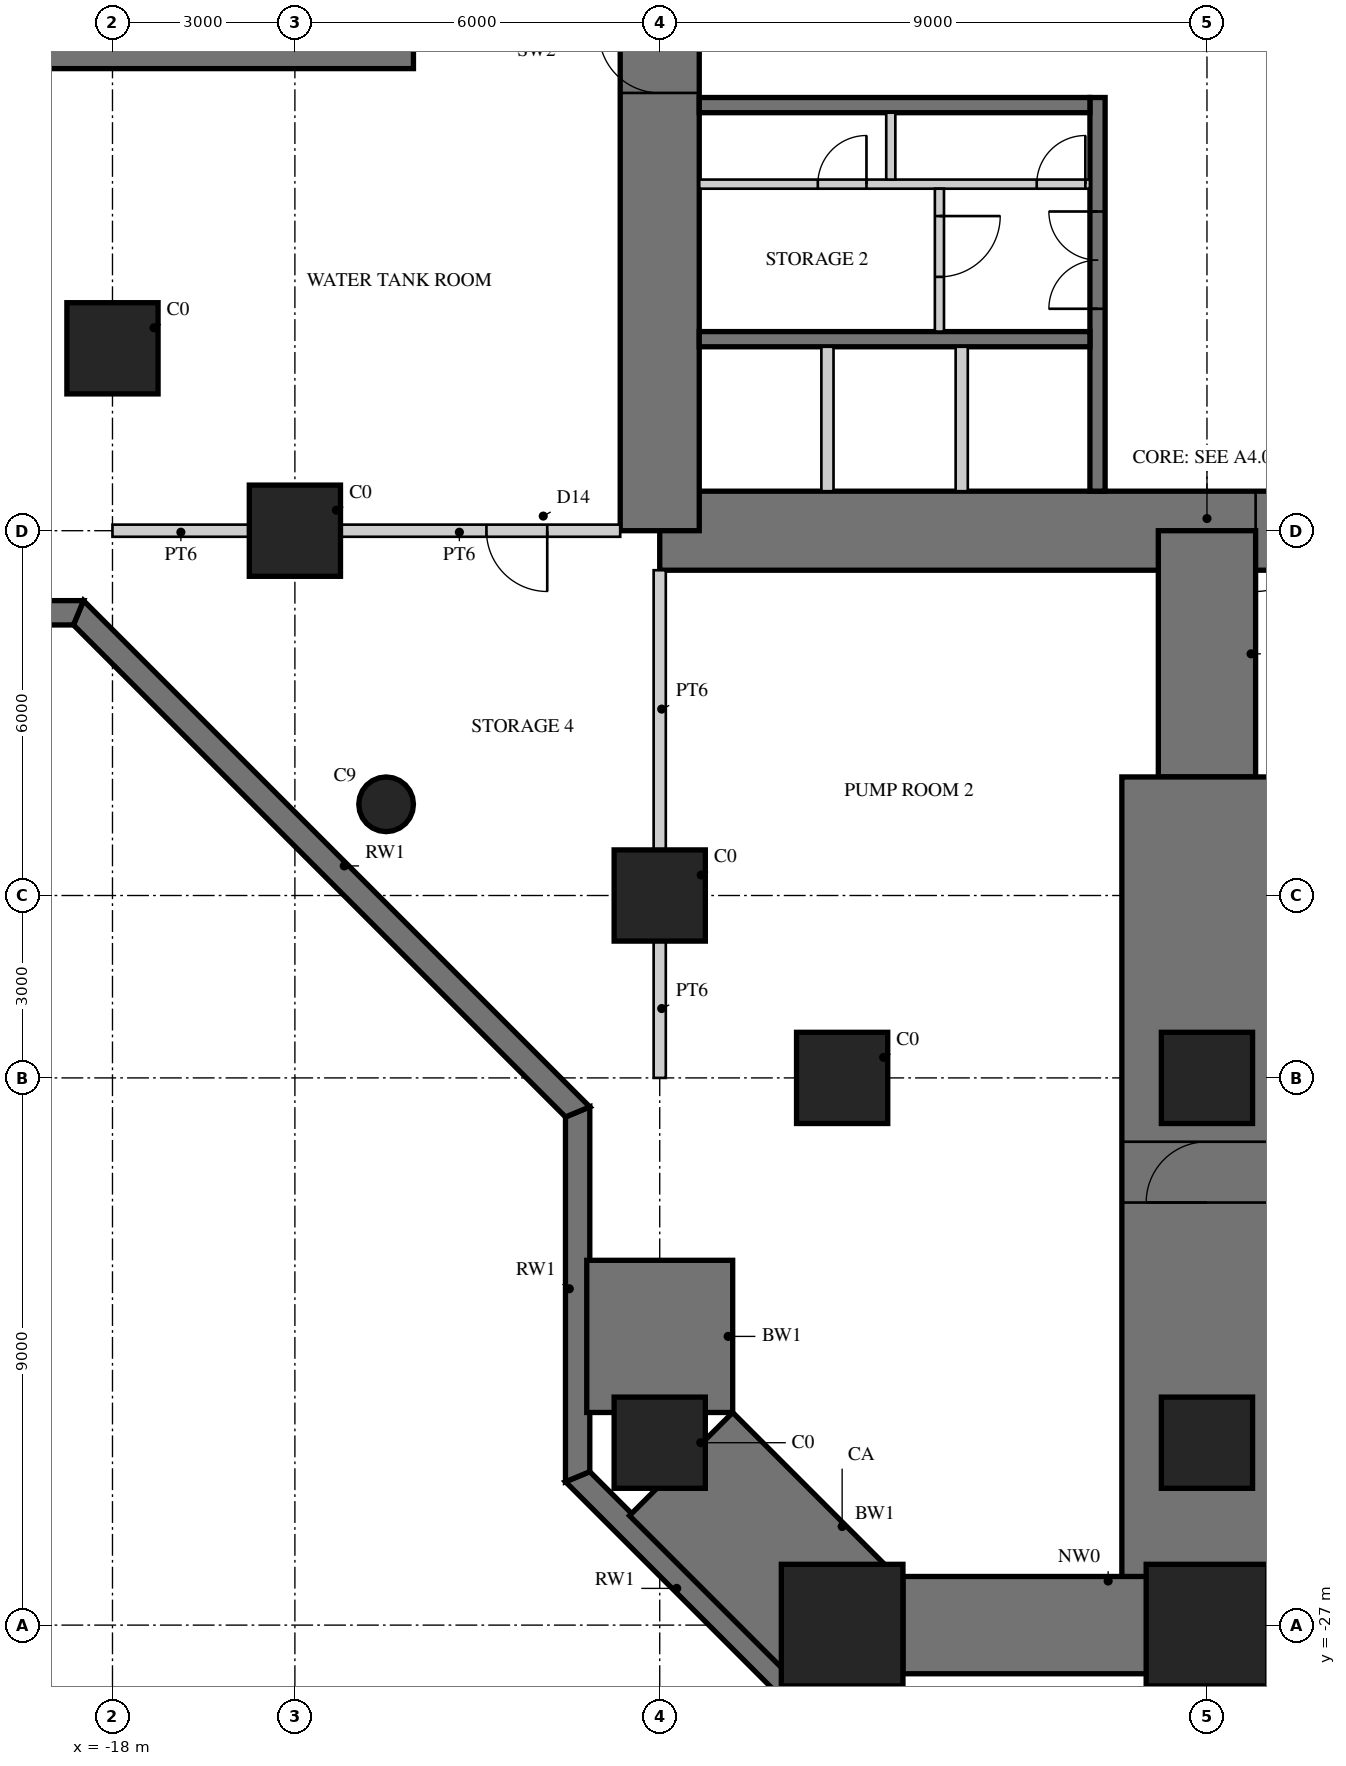
"""IFC4 building model, lengths in metres.
Left out: names, types, materials, properties, quantities, classifications, styles, units other than length and angle.
Written with IfcOpenShell. Run it as: python <this file> out.ifc"""

import sys

from ifc_helpers import new_model, si_unit, direction, frame, frame_2d, origin, origin_2d, place, context, subcontext, project, spatial, polyline, rectangle, circle, outline, extrude, element, fill, save


model = new_model("IFC4")
c1 = context("Model", 3, precision=1e-05, world=origin(), true_north=direction((0.0, 1.0)))
c2 = subcontext(c1, "Body", "Model", "MODEL_VIEW")
j1 = project(units=[si_unit("LENGTHUNIT", "METRE"), si_unit("PLANEANGLEUNIT", "RADIAN")], contexts=[c1])
p1 = place(None, origin())
s1 = spatial("IfcSite", under=j1, at=p1, CompositionType="ELEMENT")
p2 = place(p1, origin())
s2 = spatial("IfcBuilding", under=s1, at=p2, CompositionType="ELEMENT")
p3 = place(p2, frame((0.0, 0.0, -8.0)))
s3 = spatial("IfcBuildingStorey", under=s2, at=p3, CompositionType="ELEMENT", Elevation=-8.0)
p4 = place(p3, origin())
e1 = element("IfcWall", 1, at=p4, inside=s3, PredefinedType="SOLIDWALL", context=c2, shape_type="SweptSolid", body=[
    extrude(outline(polyline([(-6.476, -28.15), (-6.642, -28.55), (-10.55, -24.642), (-10.15, -24.476), (-6.476, -28.15)])), origin(), (0.0, 0.0, 1.0), 4.0),
])
p5 = place(p3, origin())
e2 = element("IfcWall", 2, at=p5, inside=s3, PredefinedType="SOLIDWALL", context=c2, shape_type="SweptSolid", body=[
    extrude(outline(polyline([(-10.15, -24.476), (-10.55, -24.642), (-10.55, -18.642), (-10.15, -18.476), (-10.15, -24.476)])), origin(), (0.0, 0.0, 1.0), 4.0),
])
p6 = place(p3, origin())
e3 = element("IfcWall", 3, at=p6, inside=s3, PredefinedType="SOLIDWALL", context=c2, shape_type="SweptSolid", body=[
    extrude(outline(polyline([(-10.15, -18.476), (-10.55, -18.642), (-18.642, -10.55), (-18.476, -10.15), (-10.15, -18.476)])), origin(), (0.0, 0.0, 1.0), 4.0),
])
p7 = place(p3, origin())
e4 = element("IfcWall", 4, at=p7, inside=s3, PredefinedType="SOLIDWALL", context=c2, shape_type="SweptSolid", body=[
    extrude(outline(polyline([(-18.476, -10.15), (-18.642, -10.55), (-24.642, -10.55), (-24.476, -10.15), (-18.476, -10.15)])), origin(), (0.0, 0.0, 1.0), 4.0),
])
p8 = place(p3, frame((-9.0, -9.0, 0.0), z_axis=(0.0, 0.0, 1.0), x_axis=(1.0, 0.0, 0.0)))
e5 = element("IfcWall", 5, at=p8, inside=s3, PredefinedType="SHEAR", context=c2, shape_type="SweptSolid", body=[
    extrude(rectangle(XDim=18.0, YDim=1.3, at=frame_2d((9.0, 0.0))), origin(), (0.0, 0.0, 1.0), 4.0),
])
p9 = place(p8, frame((9.8, 0.0, 0.0)))
e6 = element("IfcOpeningElement", 6, at=p9, cuts=e5, PredefinedType="OPENING", context=c2, shape_type="SweptSolid", body=[
    extrude(rectangle(XDim=1.0, YDim=2.4, at=frame_2d((0.5, 1.2))), frame((0.0, 0.66, 0.0), z_axis=(0.0, -1.0, 0.0), x_axis=(1.0, 0.0, 0.0)), (0.0, 0.0, 1.0), 1.32),
])
p10 = place(p3, frame((-9.0, 9.0, 0.0), z_axis=(0.0, 0.0, 1.0), x_axis=(0.0, -1.0, 0.0)))
e7 = element("IfcWall", 7, at=p10, inside=s3, PredefinedType="SHEAR", context=c2, shape_type="SweptSolid", body=[
    extrude(rectangle(XDim=18.0, YDim=1.3, at=frame_2d((9.0, 0.0))), origin(), (0.0, 0.0, 1.0), 4.0),
])
p11 = place(p10, frame((9.8, 0.0, 0.0)))
e8 = element("IfcOpeningElement", 8, at=p11, cuts=e7, PredefinedType="OPENING", context=c2, shape_type="SweptSolid", body=[
    extrude(rectangle(XDim=1.0, YDim=2.4, at=frame_2d((0.5, 1.2))), frame((0.0, 0.66, 0.0), z_axis=(0.0, -1.0, 0.0), x_axis=(1.0, 0.0, 0.0)), (0.0, 0.0, 1.0), 1.32),
])
p12 = place(p3, frame((-1.8, -1.875, 0.0), z_axis=(0.0, 0.0, 1.0), x_axis=(0.0, -1.0, 0.0)))
e9 = element("IfcWall", 9, at=p12, inside=s3, PredefinedType="SHEAR", context=c2, shape_type="SweptSolid", body=[
    extrude(rectangle(XDim=6.475, YDim=0.25, at=frame_2d((3.238, 0.0))), origin(), (0.0, 0.0, 1.0), 4.0),
])
p13 = place(p12, frame((1.875, 0.0, 0.0)))
e10 = element("IfcOpeningElement", 10, at=p13, cuts=e9, PredefinedType="OPENING", context=c2, shape_type="SweptSolid", body=[
    extrude(rectangle(XDim=1.6, YDim=2.4, at=frame_2d((0.8, 1.2))), frame((0.0, 0.135, 0.0), z_axis=(0.0, -1.0, 0.0), x_axis=(1.0, 0.0, 0.0)), (0.0, 0.0, 1.0), 0.27),
])
for number, where, z_axis, x_axis in (
    (11, (-1.925, -2.0, 0.0), (0.0, 0.0, 1.0), (-1.0, 0.0, 0.0)),
    (12, (-1.925, -5.85, 0.0), (0.0, 0.0, 1.0), (-1.0, 0.0, 0.0)),
):
    element("IfcWall", number, at=place(p3, frame(where, z_axis=z_axis, x_axis=x_axis)), inside=s3, PredefinedType="SHEAR", context=c2, shape_type="SweptSolid", body=[
        extrude(rectangle(XDim=6.425, YDim=0.25, at=frame_2d((3.212, 0.0))), origin(), (0.0, 0.0, 1.0), 4.0),
    ])
p14 = place(p3, frame((-1.925, -3.3, 0.0), z_axis=(0.0, 0.0, 1.0), x_axis=(-1.0, 0.0, 0.0)))
e13 = element("IfcWall", 13, at=p14, inside=s3, PredefinedType="PARTITIONING", context=c2, shape_type="SweptSolid", body=[
    extrude(rectangle(XDim=6.425, YDim=0.15, at=frame_2d((3.212, 0.0))), origin(), (0.0, 0.0, 1.0), 4.0),
])
p15 = place(p14, frame((0.075, 0.0, 0.0)))
e14 = element("IfcOpeningElement", 14, at=p15, cuts=e13, PredefinedType="OPENING", context=c2, shape_type="SweptSolid", body=[
    extrude(rectangle(XDim=0.8, YDim=2.1, at=frame_2d((0.4, 1.05))), frame((0.0, 0.085, 0.0), z_axis=(0.0, -1.0, 0.0), x_axis=(1.0, 0.0, 0.0)), (0.0, 0.0, 1.0), 0.17),
])
p16 = place(p14, frame((3.675, 0.0, 0.0)))
e15 = element("IfcOpeningElement", 15, at=p16, cuts=e13, PredefinedType="OPENING", context=c2, shape_type="SweptSolid", body=[
    extrude(rectangle(XDim=0.8, YDim=2.1, at=frame_2d((0.4, 1.05))), frame((0.0, 0.085, 0.0), z_axis=(0.0, -1.0, 0.0), x_axis=(1.0, 0.0, 0.0)), (0.0, 0.0, 1.0), 0.17),
])
p17 = place(p3, frame((-5.2, -2.125, 0.0), z_axis=(0.0, 0.0, 1.0), x_axis=(0.0, -1.0, 0.0)))
e16 = element("IfcWall", 16, at=p17, inside=s3, PredefinedType="PARTITIONING", context=c2, shape_type="SweptSolid", body=[
    extrude(rectangle(XDim=1.1, YDim=0.15, at=frame_2d((0.55, 0.0))), origin(), (0.0, 0.0, 1.0), 4.0),
])
for number, where, z_axis, x_axis in (
    (17, (-4.033, -5.975, 0.0), (0.0, 0.0, 1.0), (0.0, -1.0, 0.0)),
    (18, (-6.242, -5.975, 0.0), (0.0, 0.0, 1.0), (0.0, -1.0, 0.0)),
):
    element("IfcWall", number, at=place(p3, frame(where, z_axis=z_axis, x_axis=x_axis)), inside=s3, PredefinedType="PARTITIONING", context=c2, shape_type="SweptSolid", body=[
        extrude(rectangle(XDim=2.375, YDim=0.2, at=frame_2d((1.188, 0.0))), origin(), (0.0, 0.0, 1.0), 4.0),
    ])
p18 = place(p3, frame((0.0, -9.0, 0.0), z_axis=(0.0, 0.0, 1.0), x_axis=(0.0, -1.0, 0.0)))
e19 = element("IfcWall", 19, at=p18, inside=s3, PredefinedType="SHEAR", context=c2, shape_type="SweptSolid", body=[
    extrude(rectangle(XDim=4.05, YDim=1.6, at=frame_2d((2.025, 0.0))), origin(), (0.0, 0.0, 1.0), 4.0),
])
p19 = place(p3, frame((0.0, -13.05, 0.0), z_axis=(0.0, 0.0, 1.0), x_axis=(0.0, -1.0, 0.0)))
e20 = element("IfcWall", 20, at=p19, inside=s3, PredefinedType="SHEAR", context=c2, shape_type="SweptSolid", body=[
    extrude(rectangle(XDim=13.95, YDim=2.8, at=frame_2d((6.975, 0.0))), origin(), (0.0, 0.0, 1.0), 4.0),
])
p20 = place(p19, frame((6.0, 0.0, 0.0)))
e21 = element("IfcOpeningElement", 21, at=p20, cuts=e20, PredefinedType="OPENING", context=c2, shape_type="SweptSolid", body=[
    extrude(rectangle(XDim=1.0, YDim=2.2, at=frame_2d((0.5, 1.1))), frame((0.0, 1.41, 0.0), z_axis=(0.0, -1.0, 0.0), x_axis=(1.0, 0.0, 0.0)), (0.0, 0.0, 1.0), 2.82),
])
p21 = place(p3, frame((-9.0, -21.0, 0.0), z_axis=(0.0, 0.0, 1.0), x_axis=(0.0, -1.0, 0.0)))
e22 = element("IfcWall", 22, at=p21, inside=s3, PredefinedType="SHEAR", context=c2, shape_type="SweptSolid", body=[
    extrude(rectangle(XDim=2.503, YDim=2.4, at=frame_2d((1.251, 0.0))), origin(), (0.0, 0.0, 1.0), 4.0),
])
p22 = place(p3, frame((-8.648, -24.352, 0.0), z_axis=(0.0, 0.0, 1.0), x_axis=(0.707106781187, -0.707106781187, 0.0)))
e23 = element("IfcWall", 23, at=p22, inside=s3, PredefinedType="SHEAR", context=c2, shape_type="SweptSolid", body=[
    extrude(rectangle(XDim=3.745, YDim=2.4, at=frame_2d((1.873, 0.0))), origin(), (0.0, 0.0, 1.0), 4.0),
])
p23 = place(p3, frame((-5.0, -27.0, 0.0), z_axis=(0.0, 0.0, 1.0), x_axis=(1.0, 0.0, 0.0)))
e24 = element("IfcWall", 24, at=p23, inside=s3, PredefinedType="SHEAR", context=c2, shape_type="SweptSolid", body=[
    extrude(rectangle(XDim=10.0, YDim=1.6, at=frame_2d((5.0, 0.0))), origin(), (0.0, 0.0, 1.0), 4.0),
])
p24 = place(p3, frame((-13.05, 0.0, 0.0), z_axis=(0.0, 0.0, 1.0), x_axis=(-1.0, 0.0, 0.0)))
e25 = element("IfcWall", 25, at=p24, inside=s3, PredefinedType="SHEAR", context=c2, shape_type="SweptSolid", body=[
    extrude(rectangle(XDim=13.95, YDim=2.8, at=frame_2d((6.975, 0.0))), origin(), (0.0, 0.0, 1.0), 4.0),
])
p25 = place(p24, frame((6.0, 0.0, 0.0)))
e26 = element("IfcOpeningElement", 26, at=p25, cuts=e25, PredefinedType="OPENING", context=c2, shape_type="SweptSolid", body=[
    extrude(rectangle(XDim=1.0, YDim=2.2, at=frame_2d((0.5, 1.1))), frame((0.0, 1.41, 0.0), z_axis=(0.0, -1.0, 0.0), x_axis=(1.0, 0.0, 0.0)), (0.0, 0.0, 1.0), 2.82),
])
for number, where, z_axis, x_axis in (
    (27, (-9.0, -15.0, 0.0), (0.0, 0.0, 1.0), (1.0, 0.0, 0.0)),
    (28, (-9.0, -24.0, 0.0), (0.0, 0.0, 1.0), (1.0, 0.0, 0.0)),
):
    element("IfcColumn", number, at=place(p3, frame(where, z_axis=z_axis, x_axis=x_axis)), inside=s3, PredefinedType="COLUMN", context=c2, shape_type="SweptSolid", body=[
        extrude(rectangle(XDim=1.5, YDim=1.5, at=origin_2d()), origin(), (0.0, 0.0, 1.0), 4.0),
    ])
for number, where, z_axis, x_axis in (
    (29, (-6.0, -27.0, 0.0), (0.0, 0.0, 1.0), (1.0, 0.0, 0.0)),
    (30, (0.0, -27.0, 0.0), (0.0, 0.0, 1.0), (1.0, 0.0, 0.0)),
):
    element("IfcColumn", number, at=place(p3, frame(where, z_axis=z_axis, x_axis=x_axis)), inside=s3, PredefinedType="COLUMN", context=c2, shape_type="SweptSolid", body=[
        extrude(rectangle(XDim=2.0, YDim=2.0, at=origin_2d()), origin(), (0.0, 0.0, 1.0), 4.0),
    ])
for number, where, z_axis, x_axis in (
    (31, (-15.0, -9.0, 0.0), (0.0, 0.0, 1.0), (1.0, 0.0, 0.0)),
    (32, (-6.0, -18.0, 0.0), (0.0, 0.0, 1.0), (1.0, 0.0, 0.0)),
    (33, (0.0, -18.0, 0.0), (0.0, 0.0, 1.0), (1.0, 0.0, 0.0)),
    (34, (0.0, -24.0, 0.0), (0.0, 0.0, 1.0), (1.0, 0.0, 0.0)),
    (35, (-18.0, -6.0, 0.0), (0.0, 0.0, 1.0), (1.0, 0.0, 0.0)),
):
    element("IfcColumn", number, at=place(p3, frame(where, z_axis=z_axis, x_axis=x_axis)), inside=s3, PredefinedType="COLUMN", context=c2, shape_type="SweptSolid", body=[
        extrude(rectangle(XDim=1.5, YDim=1.5, at=origin_2d()), origin(), (0.0, 0.0, 1.0), 4.0),
    ])
p26 = place(p3, frame((-13.5, -13.5, 0.0), z_axis=(0.0, 0.0, 1.0), x_axis=(1.0, 0.0, 0.0)))
e36 = element("IfcColumn", 36, at=p26, inside=s3, PredefinedType="COLUMN", context=c2, shape_type="SweptSolid", body=[
    extrude(circle(Radius=0.45, at=origin_2d()), origin(), (0.0, 0.0, 1.0), 4.0),
])
p27 = place(p3, frame((-4.4, -3.375, 0.0), z_axis=(0.0, 0.0, 1.0), x_axis=(0.0, -1.0, 0.0)))
e37 = element("IfcWall", 37, at=p27, inside=s3, PredefinedType="PARTITIONING", context=c2, shape_type="SweptSolid", body=[
    extrude(rectangle(XDim=2.35, YDim=0.15, at=frame_2d((1.175, 0.0))), origin(), (0.0, 0.0, 1.0), 3.75),
])
p28 = place(p27, frame((0.45, 0.0, 0.0)))
e38 = element("IfcOpeningElement", 38, at=p28, cuts=e37, PredefinedType="OPENING", context=c2, shape_type="SweptSolid", body=[
    extrude(rectangle(XDim=1.0, YDim=2.1, at=frame_2d((0.5, 1.05))), frame((0.0, 0.085, 0.0), z_axis=(0.0, -1.0, 0.0), x_axis=(1.0, 0.0, 0.0)), (0.0, 0.0, 1.0), 0.17),
])
p29 = place(p3, frame((-9.65, -9.0, 0.0), z_axis=(0.0, 0.0, 1.0), x_axis=(-1.0, 0.0, 0.0)))
e39 = element("IfcWall", 39, at=p29, inside=s3, PredefinedType="SOLIDWALL", context=c2, shape_type="SweptSolid", body=[
    extrude(rectangle(XDim=4.6, YDim=0.2, at=frame_2d((2.3, 0.0))), origin(), (0.0, 0.0, 1.0), 2.75),
])
p30 = place(p29, frame((1.2, 0.0, 0.0)))
e40 = element("IfcOpeningElement", 40, at=p30, cuts=e39, PredefinedType="OPENING", context=c2, shape_type="SweptSolid", body=[
    extrude(rectangle(XDim=1.0, YDim=2.2, at=frame_2d((0.5, 1.1))), frame((0.0, 0.11, 0.0), z_axis=(0.0, -1.0, 0.0), x_axis=(1.0, 0.0, 0.0)), (0.0, 0.0, 1.0), 0.22),
])
p31 = place(p3, frame((-15.75, -9.0, 0.0), z_axis=(0.0, 0.0, 1.0), x_axis=(-1.0, 0.0, 0.0)))
e41 = element("IfcWall", 41, at=p31, inside=s3, PredefinedType="SOLIDWALL", context=c2, shape_type="SweptSolid", body=[
    extrude(rectangle(XDim=2.25, YDim=0.2, at=frame_2d((1.125, 0.0))), origin(), (0.0, 0.0, 1.0), 2.75),
])
p32 = place(p3, frame((-9.0, -14.25, 0.0), z_axis=(0.0, 0.0, 1.0), x_axis=(0.0, 1.0, 0.0)))
e42 = element("IfcWall", 42, at=p32, inside=s3, PredefinedType="SOLIDWALL", context=c2, shape_type="SweptSolid", body=[
    extrude(rectangle(XDim=4.6, YDim=0.2, at=frame_2d((2.3, 0.0))), origin(), (0.0, 0.0, 1.0), 2.75),
])
p33 = place(p3, frame((-9.0, -18.0, 0.0), z_axis=(0.0, 0.0, 1.0), x_axis=(0.0, 1.0, 0.0)))
e43 = element("IfcWall", 43, at=p33, inside=s3, PredefinedType="SOLIDWALL", context=c2, shape_type="SweptSolid", body=[
    extrude(rectangle(XDim=2.25, YDim=0.2, at=frame_2d((1.125, 0.0))), origin(), (0.0, 0.0, 1.0), 2.75),
])
p34 = place(p28, origin())
e44 = element("IfcDoor", 44, at=p34, inside=s3, OperationType="SINGLE_SWING_LEFT", PredefinedType="DOOR", context=c2, shape_type="SweptSolid", body=[
    extrude(rectangle(XDim=1.0, YDim=2.1, at=frame_2d((0.5, 1.05))), frame((0.0, 0.025, 0.0), z_axis=(0.0, -1.0, 0.0), x_axis=(1.0, 0.0, 0.0)), (0.0, 0.0, 1.0), 0.05),
])
fill(e38, e44)
p35 = place(p30, origin())
e45 = element("IfcDoor", 45, at=p35, inside=s3, OperationType="SINGLE_SWING_LEFT", PredefinedType="DOOR", context=c2, shape_type="SweptSolid", body=[
    extrude(rectangle(XDim=1.0, YDim=2.2, at=frame_2d((0.5, 1.1))), frame((0.0, 0.025, 0.0), z_axis=(0.0, -1.0, 0.0), x_axis=(1.0, 0.0, 0.0)), (0.0, 0.0, 1.0), 0.05),
])
fill(e40, e45)
p36 = place(p20, frame((1.0, 0.0, 0.0), z_axis=(0.0, 0.0, 1.0), x_axis=(-1.0, 0.0, 0.0)))
e46 = element("IfcDoor", 46, at=p36, inside=s3, OperationType="SINGLE_SWING_LEFT", PredefinedType="DOOR", context=c2, shape_type="SweptSolid", body=[
    extrude(rectangle(XDim=1.0, YDim=2.2, at=frame_2d((0.5, 1.1))), frame((0.0, 0.025, 0.0), z_axis=(0.0, -1.0, 0.0), x_axis=(1.0, 0.0, 0.0)), (0.0, 0.0, 1.0), 0.05),
])
fill(e21, e46)
p37 = place(p9, frame((1.0, 0.0, 0.0), z_axis=(0.0, 0.0, 1.0), x_axis=(-1.0, 0.0, 0.0)))
e47 = element("IfcDoor", 47, at=p37, inside=s3, OperationType="SINGLE_SWING_RIGHT", PredefinedType="DOOR", context=c2, shape_type="SweptSolid", body=[
    extrude(rectangle(XDim=1.0, YDim=2.4, at=frame_2d((0.5, 1.2))), frame((0.0, -0.005, 0.0), z_axis=(0.0, -1.0, 0.0), x_axis=(1.0, 0.0, 0.0)), (0.0, 0.0, 1.0), 0.05),
])
fill(e6, e47)
p38 = place(p11, frame((1.0, 0.0, 0.0), z_axis=(0.0, 0.0, 1.0), x_axis=(-1.0, 0.0, 0.0)))
e48 = element("IfcDoor", 48, at=p38, inside=s3, OperationType="SINGLE_SWING_RIGHT", PredefinedType="DOOR", context=c2, shape_type="SweptSolid", body=[
    extrude(rectangle(XDim=1.0, YDim=2.4, at=frame_2d((0.5, 1.2))), frame((0.0, -0.005, 0.0), z_axis=(0.0, -1.0, 0.0), x_axis=(1.0, 0.0, 0.0)), (0.0, 0.0, 1.0), 0.05),
])
fill(e8, e48)
p39 = place(p13, frame((1.6, 0.0, 0.0), z_axis=(0.0, 0.0, 1.0), x_axis=(-1.0, 0.0, 0.0)))
e49 = element("IfcDoor", 49, at=p39, inside=s3, OperationType="DOUBLE_DOOR_SINGLE_SWING", PredefinedType="DOOR", context=c2, shape_type="SweptSolid", body=[
    extrude(rectangle(XDim=1.6, YDim=2.4, at=frame_2d((0.8, 1.2))), frame((0.0, 0.025, 0.0), z_axis=(0.0, -1.0, 0.0), x_axis=(1.0, 0.0, 0.0)), (0.0, 0.0, 1.0), 0.05),
])
fill(e10, e49)
p40 = place(p15, frame((0.8, 0.0, 0.0), z_axis=(0.0, 0.0, 1.0), x_axis=(-1.0, 0.0, 0.0)))
e50 = element("IfcDoor", 50, at=p40, inside=s3, OperationType="SINGLE_SWING_RIGHT", PredefinedType="DOOR", context=c2, shape_type="SweptSolid", body=[
    extrude(rectangle(XDim=0.8, YDim=2.1, at=frame_2d((0.4, 1.05))), frame((0.0, 0.025, 0.0), z_axis=(0.0, -1.0, 0.0), x_axis=(1.0, 0.0, 0.0)), (0.0, 0.0, 1.0), 0.05),
])
fill(e14, e50)
p41 = place(p16, frame((0.8, 0.0, 0.0), z_axis=(0.0, 0.0, 1.0), x_axis=(-1.0, 0.0, 0.0)))
e51 = element("IfcDoor", 51, at=p41, inside=s3, OperationType="SINGLE_SWING_RIGHT", PredefinedType="DOOR", context=c2, shape_type="SweptSolid", body=[
    extrude(rectangle(XDim=0.8, YDim=2.1, at=frame_2d((0.4, 1.05))), frame((0.0, 0.025, 0.0), z_axis=(0.0, -1.0, 0.0), x_axis=(1.0, 0.0, 0.0)), (0.0, 0.0, 1.0), 0.05),
])
fill(e15, e51)
save(model, sys.argv[1])
